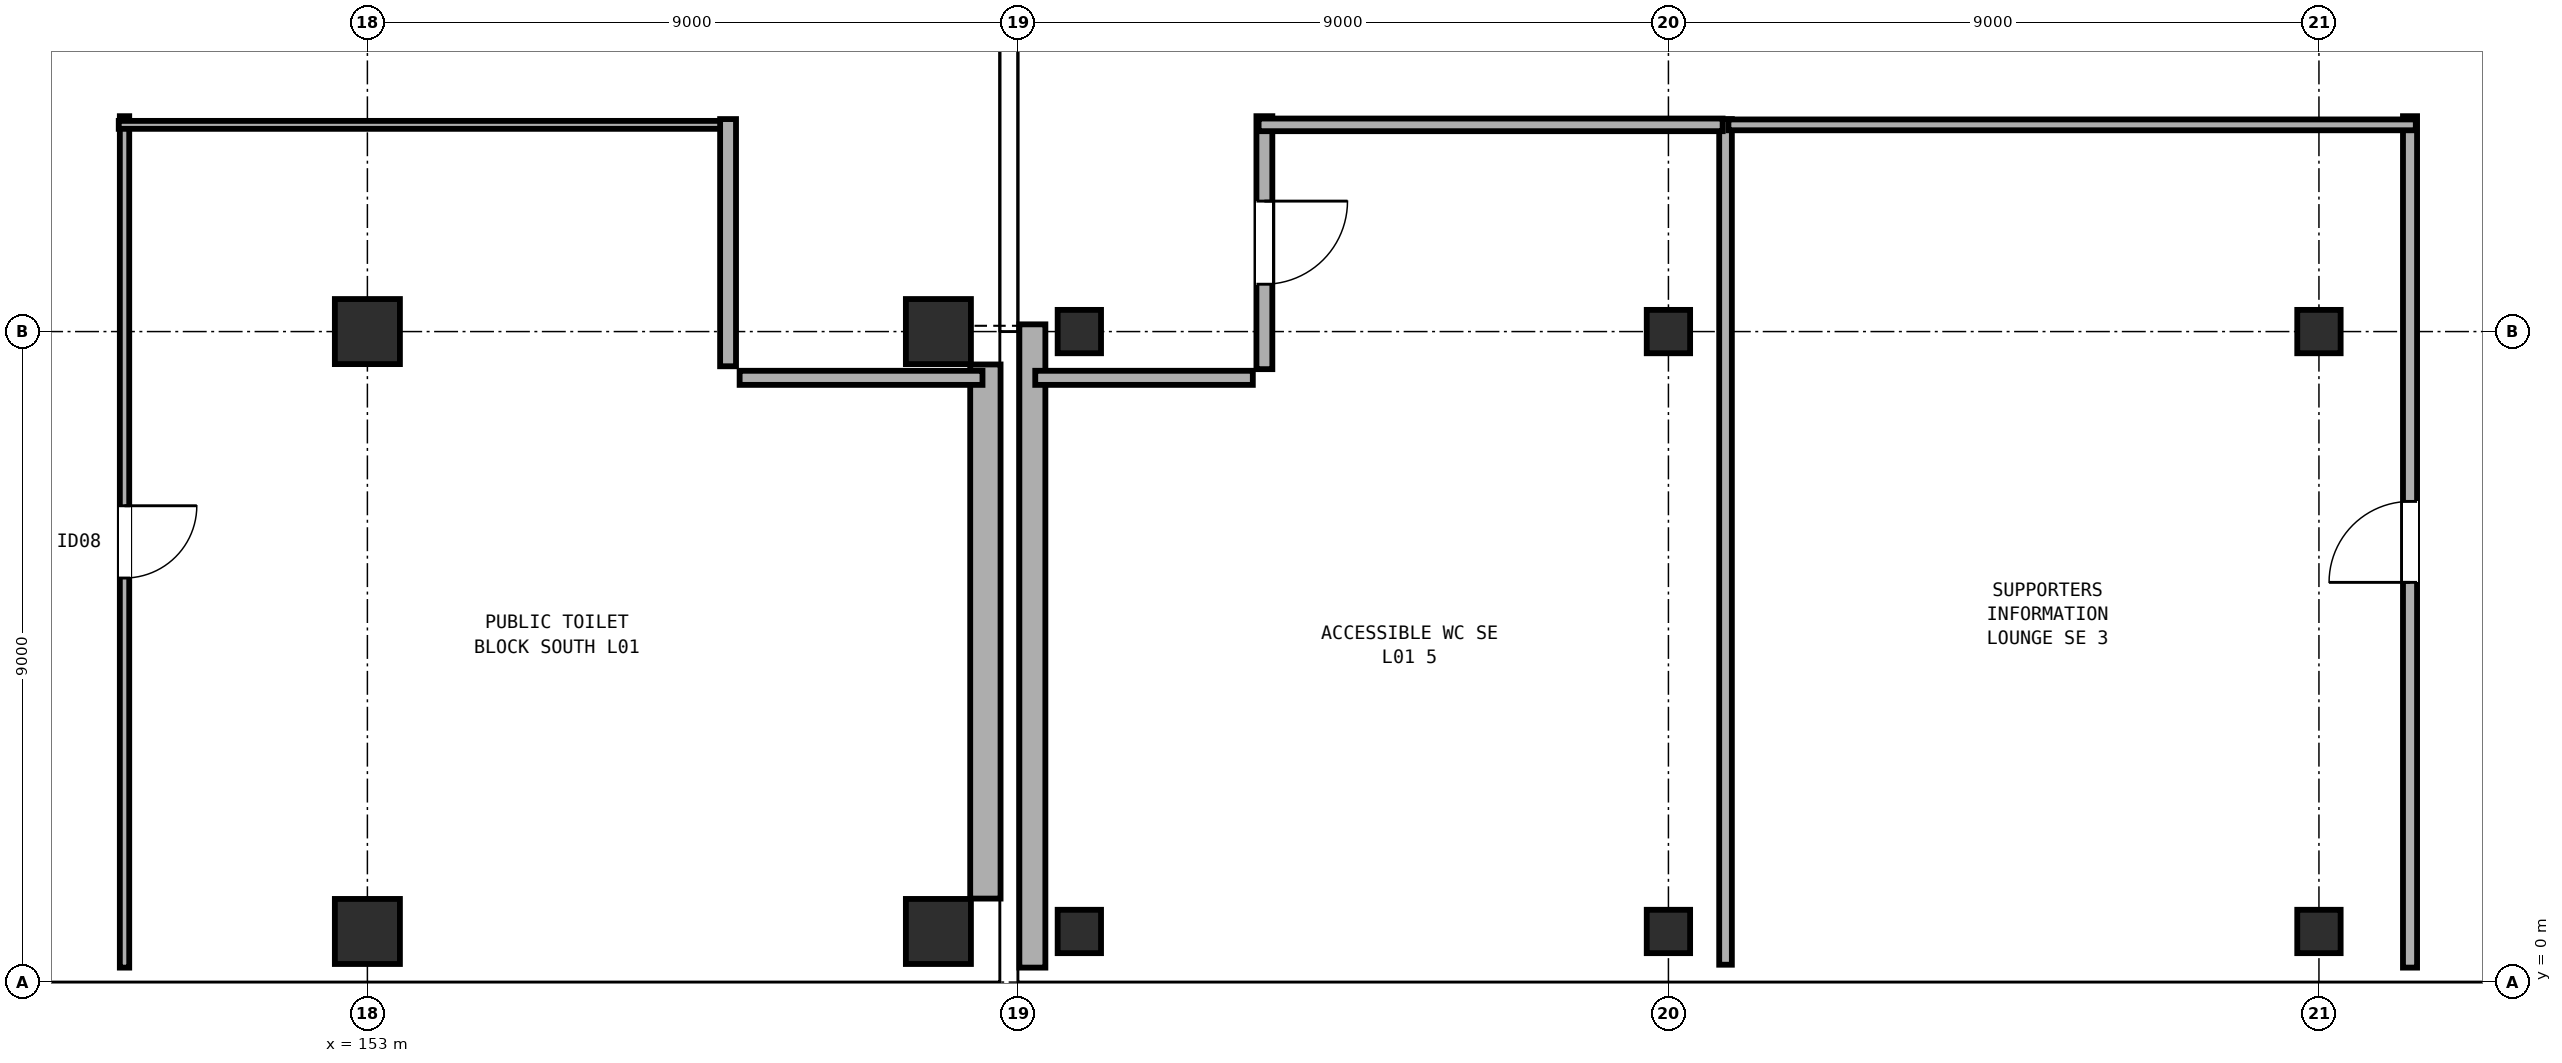
"""IFC4 building model, lengths in metres.
Left out: names, types, materials, properties, quantities, classifications, styles, units other than length and angle.
Written with IfcOpenShell. Run it as: python <this file> out.ifc"""

import sys

from ifc_helpers import new_model, si_unit, direction, frame, frame_2d, origin, origin_2d, place, context, subcontext, project, spatial, rectangle, extrude, element, fill, save


model = new_model("IFC4")
c1 = context("Model", 3, precision=1e-05, world=origin(), true_north=direction((0.0, 1.0)))
c2 = subcontext(c1, "Body", "Model", "MODEL_VIEW")
j1 = project(units=[si_unit("LENGTHUNIT", "METRE"), si_unit("PLANEANGLEUNIT", "RADIAN")], contexts=[c1])
p1 = place(None, origin())
s1 = spatial("IfcSite", under=j1, at=p1, CompositionType="ELEMENT")
p2 = place(p1, origin())
s2 = spatial("IfcBuilding", under=s1, at=p2, CompositionType="ELEMENT")
p3 = place(p2, frame((0.0, 0.0, 4.8)))
s3 = spatial("IfcBuildingStorey", under=s2, at=p3, CompositionType="ELEMENT", Elevation=4.8)
for number, where, z_axis, x_axis in (
    (1, (153.0, 0.7, 0.0), (0.0, 0.0, 1.0), (1.0, 0.0, 0.0)),
    (2, (153.0, 9.0, 0.0), (0.0, 0.0, 1.0), (1.0, 0.0, 0.0)),
    (3, (160.9, 0.7, 0.0), (0.0, 0.0, 1.0), (1.0, 0.0, 0.0)),
    (4, (160.9, 9.0, 0.0), (0.0, 0.0, 1.0), (1.0, 0.0, 0.0)),
):
    element("IfcColumn", number, at=place(p3, frame(where, z_axis=z_axis, x_axis=x_axis)), inside=s3, PredefinedType="COLUMN", context=c2, shape_type="SweptSolid", body=[
        extrude(rectangle(XDim=0.9, YDim=0.9, at=origin_2d()), origin(), (0.0, 0.0, 1.0), 4.8),
    ])
for number, where, z_axis, x_axis in (
    (5, (162.85, 0.7, 0.0), (0.0, 0.0, 1.0), (1.0, 0.0, 0.0)),
    (6, (162.85, 9.0, 0.0), (0.0, 0.0, 1.0), (1.0, 0.0, 0.0)),
    (7, (171.0, 0.7, 0.0), (0.0, 0.0, 1.0), (1.0, 0.0, 0.0)),
    (8, (171.0, 9.0, 0.0), (0.0, 0.0, 1.0), (1.0, 0.0, 0.0)),
    (9, (180.0, 0.7, 0.0), (0.0, 0.0, 1.0), (1.0, 0.0, 0.0)),
    (10, (180.0, 9.0, 0.0), (0.0, 0.0, 1.0), (1.0, 0.0, 0.0)),
):
    element("IfcColumn", number, at=place(p3, frame(where, z_axis=z_axis, x_axis=x_axis)), inside=s3, PredefinedType="COLUMN", context=c2, shape_type="SweptSolid", body=[
        extrude(rectangle(XDim=0.6, YDim=0.6, at=origin_2d()), origin(), (0.0, 0.0, 1.0), 4.8),
    ])
p4 = place(p3, frame((161.55, 8.545, 0.0), z_axis=(0.0, 0.0, 1.0), x_axis=(0.0, -1.0, 0.0)))
e11 = element("IfcWall", 11, at=p4, inside=s3, PredefinedType="SOLIDWALL", context=c2, shape_type="SweptSolid", body=[
    extrude(rectangle(XDim=7.39, YDim=0.42, at=frame_2d((3.695, 0.0))), origin(), (0.0, 0.0, 1.0), 3.28),
])
p5 = place(p3, frame((160.445, 0.2, 0.0), z_axis=(0.0, 0.0, 1.0), x_axis=(-1.0, 0.0, 0.0)))
e12 = element("IfcWall", 12, at=p5, inside=s3, PredefinedType="SOLIDWALL", context=c2, shape_type="SweptSolid", body=[
    extrude(rectangle(XDim=6.99, YDim=0.4, at=frame_2d((3.495, 0.0))), origin(), (0.0, 0.0, 1.0), 3.58),
])
p6 = place(p5, frame((2.245, 0.0, 0.9)))
e13 = element("IfcOpeningElement", 13, at=p6, cuts=e12, PredefinedType="OPENING", context=c2, shape_type="SweptSolid", body=[
    extrude(rectangle(XDim=2.5, YDim=2.1, at=frame_2d((1.25, 1.05))), frame((0.0, 0.21, 0.0), z_axis=(0.0, -1.0, 0.0), x_axis=(1.0, 0.0, 0.0)), (0.0, 0.0, 1.0), 0.42),
])
p7 = place(p3, frame((152.545, 0.2, 0.0), z_axis=(0.0, 0.0, 1.0), x_axis=(-1.0, 0.0, 0.0)))
e14 = element("IfcWall", 14, at=p7, inside=s3, PredefinedType="SOLIDWALL", context=c2, shape_type="SweptSolid", body=[
    extrude(rectangle(XDim=8.09, YDim=0.38, at=frame_2d((4.045, 0.0))), origin(), (0.0, 0.0, 1.0), 3.58),
])
p8 = place(p7, frame((4.113, 0.0, 0.9)))
e15 = element("IfcOpeningElement", 15, at=p8, cuts=e14, PredefinedType="OPENING", context=c2, shape_type="SweptSolid", body=[
    extrude(rectangle(XDim=2.6, YDim=2.15, at=frame_2d((1.3, 1.075))), frame((0.0, 0.2, 0.0), z_axis=(0.0, -1.0, 0.0), x_axis=(1.0, 0.0, 0.0)), (0.0, 0.0, 1.0), 0.4),
])
p9 = place(p3, frame((162.2, 0.2, 0.0), z_axis=(0.0, 0.0, 1.0), x_axis=(0.0, 1.0, 0.0)))
e16 = element("IfcWall", 16, at=p9, inside=s3, PredefinedType="SOLIDWALL", context=c2, shape_type="SweptSolid", body=[
    extrude(rectangle(XDim=8.9, YDim=0.36, at=frame_2d((4.45, 0.0))), origin(), (0.0, 0.0, 1.0), 3.28),
])
p10 = place(p3, frame((188.695, 0.2, 0.0), z_axis=(0.0, 0.0, 1.0), x_axis=(-1.0, 0.0, 0.0)))
e17 = element("IfcWall", 17, at=p10, inside=s3, PredefinedType="SOLIDWALL", context=c2, shape_type="SweptSolid", body=[
    extrude(rectangle(XDim=8.39, YDim=0.42, at=frame_2d((4.195, 0.0))), origin(), (0.0, 0.0, 1.0), 3.58),
])
p11 = place(p10, frame((4.337, 0.0, 0.9)))
e18 = element("IfcOpeningElement", 18, at=p11, cuts=e17, PredefinedType="OPENING", context=c2, shape_type="SweptSolid", body=[
    extrude(rectangle(XDim=2.5, YDim=2.1, at=frame_2d((1.25, 1.05))), frame((0.0, 0.22, 0.0), z_axis=(0.0, -1.0, 0.0), x_axis=(1.0, 0.0, 0.0)), (0.0, 0.0, 1.0), 0.44),
])
p12 = place(p3, frame((179.695, 0.2, 0.0), z_axis=(0.0, 0.0, 1.0), x_axis=(-1.0, 0.0, 0.0)))
e19 = element("IfcWall", 19, at=p12, inside=s3, PredefinedType="SOLIDWALL", context=c2, shape_type="SweptSolid", body=[
    extrude(rectangle(XDim=8.39, YDim=0.4, at=frame_2d((4.195, 0.0))), origin(), (0.0, 0.0, 1.0), 3.28),
])
p13 = place(p3, frame((170.695, 0.2, 0.0), z_axis=(0.0, 0.0, 1.0), x_axis=(-1.0, 0.0, 0.0)))
e20 = element("IfcWall", 20, at=p13, inside=s3, PredefinedType="SOLIDWALL", context=c2, shape_type="SweptSolid", body=[
    extrude(rectangle(XDim=7.54, YDim=0.38, at=frame_2d((3.77, 0.0))), origin(), (0.0, 0.0, 1.0), 3.28),
])
p14 = place(p3, frame((149.64, 11.98, 0.0), z_axis=(0.0, 0.0, 1.0), x_axis=(0.0, -1.0, 0.0)))
e21 = element("IfcWall", 21, at=p14, inside=s3, PredefinedType="PARTITIONING", context=c2, shape_type="SweptSolid", body=[
    extrude(rectangle(XDim=11.78, YDim=0.13, at=frame_2d((5.89, 0.0))), origin(), (0.0, 0.0, 1.0), 3.28),
])
p15 = place(p14, frame((5.39, 0.0, 0.0)))
e22 = element("IfcOpeningElement", 22, at=p15, cuts=e21, PredefinedType="OPENING", context=c2, shape_type="SweptSolid", body=[
    extrude(rectangle(XDim=1.0, YDim=2.1, at=frame_2d((0.5, 1.05))), frame((0.0, 0.075, 0.0), z_axis=(0.0, -1.0, 0.0), x_axis=(1.0, 0.0, 0.0)), (0.0, 0.0, 1.0), 0.15),
])
p16 = place(p3, frame((149.56, 11.86, 0.0), z_axis=(0.0, 0.0, 1.0), x_axis=(1.0, 0.0, 0.0)))
e23 = element("IfcWall", 23, at=p16, inside=s3, PredefinedType="PARTITIONING", context=c2, shape_type="SweptSolid", body=[
    extrude(rectangle(XDim=8.51, YDim=0.11, at=frame_2d((4.255, 0.0))), origin(), (0.0, 0.0, 1.0), 3.28),
])
p17 = place(p3, frame((157.99, 11.94, 0.0), z_axis=(0.0, 0.0, 1.0), x_axis=(0.0, -1.0, 0.0)))
e24 = element("IfcWall", 24, at=p17, inside=s3, PredefinedType="PARTITIONING", context=c2, shape_type="SweptSolid", body=[
    extrude(rectangle(XDim=3.42, YDim=0.22, at=frame_2d((1.71, 0.0))), origin(), (0.0, 0.0, 1.0), 3.28),
])
p18 = place(p3, frame((158.15, 8.36, 0.0), z_axis=(0.0, 0.0, 1.0), x_axis=(1.0, 0.0, 0.0)))
e25 = element("IfcWall", 25, at=p18, inside=s3, PredefinedType="PARTITIONING", context=c2, shape_type="SweptSolid", body=[
    extrude(rectangle(XDim=3.36, YDim=0.195, at=frame_2d((1.68, 0.0))), origin(), (0.0, 0.0, 1.0), 3.28),
])
p19 = place(p3, frame((181.26, 0.2, 0.0), z_axis=(0.0, 0.0, 1.0), x_axis=(0.0, 1.0, 0.0)))
e26 = element("IfcWall", 26, at=p19, inside=s3, PredefinedType="PARTITIONING", context=c2, shape_type="SweptSolid", body=[
    extrude(rectangle(XDim=11.78, YDim=0.195, at=frame_2d((5.89, 0.0))), origin(), (0.0, 0.0, 1.0), 3.28),
])
p20 = place(p19, frame((5.33, 0.0, 0.0)))
e27 = element("IfcOpeningElement", 27, at=p20, cuts=e26, PredefinedType="OPENING", context=c2, shape_type="SweptSolid", body=[
    extrude(rectangle(XDim=1.12, YDim=2.22, at=frame_2d((0.56, 1.11))), frame((0.0, 0.107, 0.0), z_axis=(0.0, -1.0, 0.0), x_axis=(1.0, 0.0, 0.0)), (0.0, 0.0, 1.0), 0.215),
])
p21 = place(p3, frame((171.79, 0.24, 0.0), z_axis=(0.0, 0.0, 1.0), x_axis=(0.0, 1.0, 0.0)))
e28 = element("IfcWall", 28, at=p21, inside=s3, PredefinedType="PARTITIONING", context=c2, shape_type="SweptSolid", body=[
    extrude(rectangle(XDim=11.7, YDim=0.175, at=frame_2d((5.85, 0.0))), origin(), (0.0, 0.0, 1.0), 3.28),
])
p22 = place(p3, frame((171.83, 11.86, 0.0), z_axis=(0.0, 0.0, 1.0), x_axis=(1.0, 0.0, 0.0)))
e29 = element("IfcWall", 29, at=p22, inside=s3, PredefinedType="PARTITIONING", context=c2, shape_type="SweptSolid", body=[
    extrude(rectangle(XDim=9.51, YDim=0.15, at=frame_2d((4.755, 0.0))), origin(), (0.0, 0.0, 1.0), 3.28),
])
p23 = place(p3, frame((165.41, 11.98, 0.0), z_axis=(0.0, 0.0, 1.0), x_axis=(0.0, -1.0, 0.0)))
e30 = element("IfcWall", 30, at=p23, inside=s3, PredefinedType="PARTITIONING", context=c2, shape_type="SweptSolid", body=[
    extrude(rectangle(XDim=3.5, YDim=0.22, at=frame_2d((1.75, 0.0))), origin(), (0.0, 0.0, 1.0), 3.28),
])
p24 = place(p23, frame((1.175, 0.0, 0.0)))
e31 = element("IfcOpeningElement", 31, at=p24, cuts=e30, PredefinedType="OPENING", context=c2, shape_type="SweptSolid", body=[
    extrude(rectangle(XDim=1.15, YDim=2.15, at=frame_2d((0.575, 1.075))), frame((0.0, 0.12, 0.0), z_axis=(0.0, -1.0, 0.0), x_axis=(1.0, 0.0, 0.0)), (0.0, 0.0, 1.0), 0.24),
])
p25 = place(p3, frame((162.24, 8.36, 0.0), z_axis=(0.0, 0.0, 1.0), x_axis=(1.0, 0.0, 0.0)))
e32 = element("IfcWall", 32, at=p25, inside=s3, PredefinedType="PARTITIONING", context=c2, shape_type="SweptSolid", body=[
    extrude(rectangle(XDim=3.01, YDim=0.195, at=frame_2d((1.505, 0.0))), origin(), (0.0, 0.0, 1.0), 3.28),
])
p26 = place(p3, frame((165.33, 11.86, 0.0), z_axis=(0.0, 0.0, 1.0), x_axis=(1.0, 0.0, 0.0)))
e33 = element("IfcWall", 33, at=p26, inside=s3, PredefinedType="PARTITIONING", context=c2, shape_type="SweptSolid", body=[
    extrude(rectangle(XDim=6.42, YDim=0.175, at=frame_2d((3.21, 0.0))), origin(), (0.0, 0.0, 1.0), 3.28),
])
p27 = place(p6, origin())
e34 = element("IfcWindow", 34, at=p27, inside=s3, PartitioningType="DOUBLE_PANEL_VERTICAL", PredefinedType="WINDOW", context=c2, shape_type="SweptSolid", body=[
    extrude(rectangle(XDim=2.5, YDim=2.1, at=frame_2d((1.25, 1.05))), frame((0.0, 0.03, 0.0), z_axis=(0.0, -1.0, 0.0), x_axis=(1.0, 0.0, 0.0)), (0.0, 0.0, 1.0), 0.06),
])
fill(e13, e34)
p28 = place(p11, origin())
e35 = element("IfcWindow", 35, at=p28, inside=s3, PartitioningType="DOUBLE_PANEL_VERTICAL", PredefinedType="WINDOW", context=c2, shape_type="SweptSolid", body=[
    extrude(rectangle(XDim=2.5, YDim=2.1, at=frame_2d((1.25, 1.05))), frame((0.0, 0.03, 0.0), z_axis=(0.0, -1.0, 0.0), x_axis=(1.0, 0.0, 0.0)), (0.0, 0.0, 1.0), 0.06),
])
fill(e18, e35)
p29 = place(p15, origin())
e36 = element("IfcDoor", 36, at=p29, inside=s3, OperationType="SINGLE_SWING_LEFT", PredefinedType="DOOR", context=c2, shape_type="SweptSolid", body=[
    extrude(rectangle(XDim=1.0, YDim=2.1, at=frame_2d((0.5, 1.05))), frame((0.0, 0.025, 0.0), z_axis=(0.0, -1.0, 0.0), x_axis=(1.0, 0.0, 0.0)), (0.0, 0.0, 1.0), 0.05),
])
fill(e22, e36)
p30 = place(p20, origin())
e37 = element("IfcDoor", 37, at=p30, inside=s3, OperationType="SINGLE_SWING_LEFT", PredefinedType="DOOR", context=c2, shape_type="SweptSolid", body=[
    extrude(rectangle(XDim=1.12, YDim=2.22, at=frame_2d((0.56, 1.11))), frame((0.0, 0.025, 0.0), z_axis=(0.0, -1.0, 0.0), x_axis=(1.0, 0.0, 0.0)), (0.0, 0.0, 1.0), 0.05),
])
fill(e27, e37)
p31 = place(p24, origin())
e38 = element("IfcDoor", 38, at=p31, inside=s3, OperationType="SINGLE_SWING_LEFT", PredefinedType="DOOR", context=c2, shape_type="SweptSolid", body=[
    extrude(rectangle(XDim=1.15, YDim=2.15, at=frame_2d((0.575, 1.075))), frame((0.0, 0.025, 0.0), z_axis=(0.0, -1.0, 0.0), x_axis=(1.0, 0.0, 0.0)), (0.0, 0.0, 1.0), 0.05),
])
fill(e31, e38)
save(model, sys.argv[1])
